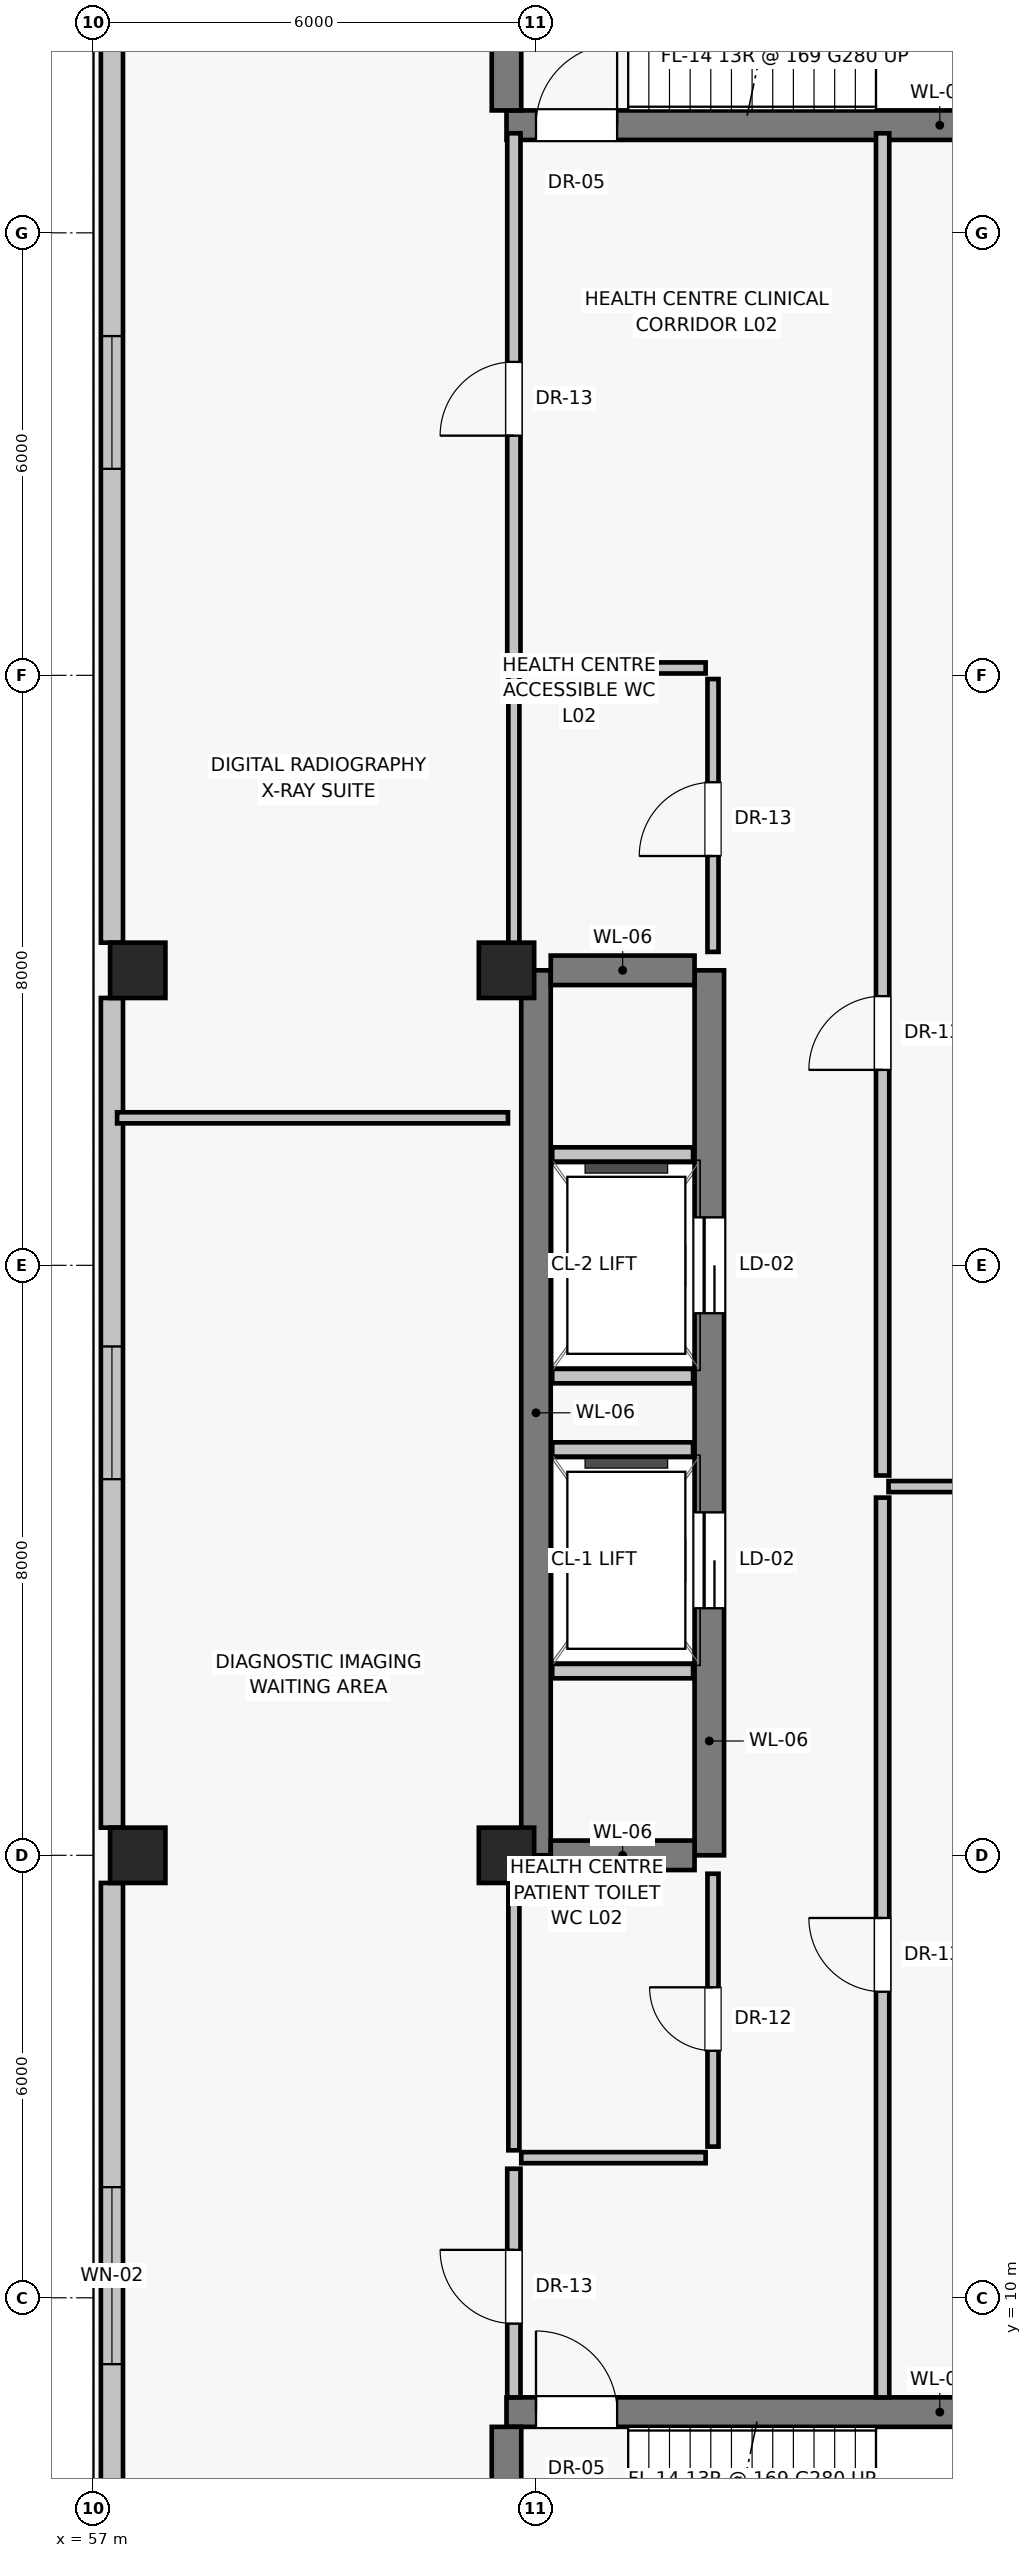
"""IFC4 building model, lengths in metres.
Left out: names, types, materials, properties, quantities, classifications, styles, units other than length and angle.
Written with IfcOpenShell. Run it as: python <this file> out.ifc"""

import sys

from ifc_helpers import new_model, si_unit, direction, frame, frame_2d, origin, origin_2d, place, context, subcontext, project, spatial, rectangle, extrude, source, transform, mapped, element, fill, save


model = new_model("IFC4")
c1 = context("Model", 3, precision=1e-05, world=origin(), true_north=direction((0.0, 1.0)))
c2 = subcontext(c1, "Body", "Model", "MODEL_VIEW")
j1 = project(units=[si_unit("LENGTHUNIT", "METRE"), si_unit("PLANEANGLEUNIT", "RADIAN")], contexts=[c1])
p1 = place(None, origin())
s1 = spatial("IfcSite", under=j1, at=p1, CompositionType="ELEMENT")
p2 = place(p1, origin())
s2 = spatial("IfcBuilding", under=s1, at=p2, CompositionType="ELEMENT")
p3 = place(p2, frame((0.0, 0.0, 9.6)))
s3 = spatial("IfcBuildingStorey", under=s2, at=p3, CompositionType="ELEMENT", Elevation=9.6)
for number, where, z_axis, x_axis in (
    (1, (57.6, 16.0, 0.0), (0.0, 0.0, 1.0), (1.0, 0.0, 0.0)),
    (2, (57.6, 28.0, 0.0), (0.0, 0.0, 1.0), (1.0, 0.0, 0.0)),
    (3, (62.6, 16.0, 0.0), (0.0, 0.0, 1.0), (1.0, 0.0, 0.0)),
    (4, (62.6, 28.0, 0.0), (0.0, 0.0, 1.0), (1.0, 0.0, 0.0)),
):
    element("IfcColumn", number, at=place(p3, frame(where, z_axis=z_axis, x_axis=x_axis)), inside=s3, PredefinedType="COLUMN", context=c2, shape_type="SweptSolid", body=[
        extrude(rectangle(XDim=0.75, YDim=0.75, at=origin_2d()), origin(), (0.0, 0.0, 1.0), 4.4),
    ])
p4 = place(p3, frame((57.25, 43.6, 0.0), z_axis=(0.0, 0.0, 1.0), x_axis=(0.0, -1.0, 0.0)))
e5 = element("IfcWall", 5, at=p4, inside=s3, PredefinedType="SOLIDWALL", context=c2, shape_type="SweptSolid", body=[
    extrude(rectangle(XDim=15.225, YDim=0.3, at=frame_2d((7.613, 0.0))), origin(), (0.0, 0.0, 1.0), 3.35),
])
p5 = place(p4, frame((7.0, 0.0, 0.85)))
e6 = element("IfcOpeningElement", 6, at=p5, cuts=e5, PredefinedType="OPENING", context=c2, shape_type="SweptSolid", body=[
    extrude(rectangle(XDim=1.8, YDim=1.65, at=frame_2d((0.9, 0.825))), frame((0.0, 0.16, 0.0), z_axis=(0.0, -1.0, 0.0), x_axis=(1.0, 0.0, 0.0)), (0.0, 0.0, 1.0), 0.32),
])
p6 = place(p3, frame((57.25, 27.625, 0.0), z_axis=(0.0, 0.0, 1.0), x_axis=(0.0, -1.0, 0.0)))
e7 = element("IfcWall", 7, at=p6, inside=s3, PredefinedType="SOLIDWALL", context=c2, shape_type="SweptSolid", body=[
    extrude(rectangle(XDim=11.25, YDim=0.3, at=frame_2d((5.625, 0.0))), origin(), (0.0, 0.0, 1.0), 3.35),
])
p7 = place(p6, frame((4.725, 0.0, 0.85)))
e8 = element("IfcOpeningElement", 8, at=p7, cuts=e7, PredefinedType="OPENING", context=c2, shape_type="SweptSolid", body=[
    extrude(rectangle(XDim=1.8, YDim=1.65, at=frame_2d((0.9, 0.825))), frame((0.0, 0.16, 0.0), z_axis=(0.0, -1.0, 0.0), x_axis=(1.0, 0.0, 0.0)), (0.0, 0.0, 1.0), 0.32),
])
p8 = place(p3, frame((57.25, 15.625, 0.0), z_axis=(0.0, 0.0, 1.0), x_axis=(0.0, -1.0, 0.0)))
e9 = element("IfcWall", 9, at=p8, inside=s3, PredefinedType="SOLIDWALL", context=c2, shape_type="SweptSolid", body=[
    extrude(rectangle(XDim=11.225, YDim=0.3, at=frame_2d((5.613, 0.0))), origin(), (0.0, 0.0, 1.0), 3.35),
])
p9 = place(p8, frame((4.125, 0.0, 0.85)))
e10 = element("IfcOpeningElement", 10, at=p9, cuts=e9, PredefinedType="OPENING", context=c2, shape_type="SweptSolid", body=[
    extrude(rectangle(XDim=2.4, YDim=1.8, at=frame_2d((1.2, 0.9))), frame((0.0, 0.16, 0.0), z_axis=(0.0, -1.0, 0.0), x_axis=(1.0, 0.0, 0.0)), (0.0, 0.0, 1.0), 0.32),
])
p10 = place(p3, frame((63.0, 16.0, 0.0), z_axis=(0.0, 0.0, 1.0), x_axis=(0.0, 1.0, 0.0)))
e11 = element("IfcWall", 11, at=p10, inside=s3, PredefinedType="SHEAR", context=c2, shape_type="SweptSolid", body=[
    extrude(rectangle(XDim=12.0, YDim=0.4, at=frame_2d((6.0, 0.0))), origin(), (0.0, 0.0, 1.0), 4.1),
])
p11 = place(p3, frame((65.35, 16.0, 0.0), z_axis=(0.0, 0.0, 1.0), x_axis=(0.0, 1.0, 0.0)))
e12 = element("IfcWall", 12, at=p11, inside=s3, PredefinedType="SHEAR", context=c2, shape_type="SweptSolid", body=[
    extrude(rectangle(XDim=12.0, YDim=0.4, at=frame_2d((6.0, 0.0))), origin(), (0.0, 0.0, 1.0), 4.1),
])
p12 = place(p11, frame((3.35, 0.0, 0.0)))
e13 = element("IfcOpeningElement", 13, at=p12, cuts=e12, PredefinedType="OPENING", context=c2, shape_type="SweptSolid", body=[
    extrude(rectangle(XDim=1.3, YDim=2.25, at=frame_2d((0.65, 1.125))), frame((0.0, 0.21, 0.0), z_axis=(0.0, -1.0, 0.0), x_axis=(1.0, 0.0, 0.0)), (0.0, 0.0, 1.0), 0.42),
])
p13 = place(p11, frame((7.35, 0.0, 0.0)))
e14 = element("IfcOpeningElement", 14, at=p13, cuts=e12, PredefinedType="OPENING", context=c2, shape_type="SweptSolid", body=[
    extrude(rectangle(XDim=1.3, YDim=2.25, at=frame_2d((0.65, 1.125))), frame((0.0, 0.21, 0.0), z_axis=(0.0, -1.0, 0.0), x_axis=(1.0, 0.0, 0.0)), (0.0, 0.0, 1.0), 0.42),
])
for number, where, z_axis, x_axis in (
    (15, (63.2, 16.0, 0.0), (0.0, 0.0, 1.0), (1.0, 0.0, 0.0)),
    (16, (63.2, 28.0, 0.0), (0.0, 0.0, 1.0), (1.0, 0.0, 0.0)),
):
    element("IfcWall", number, at=place(p3, frame(where, z_axis=z_axis, x_axis=x_axis)), inside=s3, PredefinedType="SHEAR", context=c2, shape_type="SweptSolid", body=[
        extrude(rectangle(XDim=1.95, YDim=0.4, at=frame_2d((0.975, 0.0))), origin(), (0.0, 0.0, 1.0), 4.1),
    ])
for number, where, z_axis, x_axis in (
    (17, (63.22, 18.5, 0.0), (0.0, 0.0, 1.0), (1.0, 0.0, 0.0)),
    (18, (63.22, 21.5, 0.0), (0.0, 0.0, 1.0), (1.0, 0.0, 0.0)),
    (19, (63.22, 22.5, 0.0), (0.0, 0.0, 1.0), (1.0, 0.0, 0.0)),
    (20, (63.22, 25.5, 0.0), (0.0, 0.0, 1.0), (1.0, 0.0, 0.0)),
):
    element("IfcWall", number, at=place(p3, frame(where, z_axis=z_axis, x_axis=x_axis)), inside=s3, PredefinedType="SOLIDWALL", context=c2, shape_type="SweptSolid", body=[
        extrude(rectangle(XDim=1.91, YDim=0.2, at=frame_2d((0.955, 0.0))), origin(), (0.0, 0.0, 1.0), 4.1),
    ])
p14 = place(p3, frame((62.6, 8.45, 0.0), z_axis=(0.0, 0.0, 1.0), x_axis=(1.0, 0.0, 0.0)))
e21 = element("IfcWall", 21, at=p14, inside=s3, PredefinedType="SHEAR", context=c2, shape_type="SweptSolid", body=[
    extrude(rectangle(XDim=10.0, YDim=0.4, at=frame_2d((5.0, 0.0))), origin(), (0.0, 0.0, 1.0), 4.1),
])
p15 = place(p14, frame((0.4, 0.0, 0.0)))
e22 = element("IfcOpeningElement", 22, at=p15, cuts=e21, PredefinedType="OPENING", context=c2, shape_type="SweptSolid", body=[
    extrude(rectangle(XDim=1.1, YDim=2.03, at=frame_2d((0.55, 1.015))), frame((0.0, 0.21, 0.0), z_axis=(0.0, -1.0, 0.0), x_axis=(1.0, 0.0, 0.0)), (0.0, 0.0, 1.0), 0.42),
])
p16 = place(p3, frame((62.6, 5.2, 0.0), z_axis=(0.0, 0.0, 1.0), x_axis=(0.0, 1.0, 0.0)))
e23 = element("IfcWall", 23, at=p16, inside=s3, PredefinedType="SHEAR", context=c2, shape_type="SweptSolid", body=[
    extrude(rectangle(XDim=3.05, YDim=0.4, at=frame_2d((1.525, 0.0))), origin(), (0.0, 0.0, 1.0), 4.1),
])
p17 = place(p3, frame((62.6, 39.46, 0.0), z_axis=(0.0, 0.0, 1.0), x_axis=(1.0, 0.0, 0.0)))
e24 = element("IfcWall", 24, at=p17, inside=s3, PredefinedType="SHEAR", context=c2, shape_type="SweptSolid", body=[
    extrude(rectangle(XDim=10.0, YDim=0.4, at=frame_2d((5.0, 0.0))), origin(), (0.0, 0.0, 1.0), 4.1),
])
p18 = place(p17, frame((0.4, 0.0, 0.0)))
e25 = element("IfcOpeningElement", 25, at=p18, cuts=e24, PredefinedType="OPENING", context=c2, shape_type="SweptSolid", body=[
    extrude(rectangle(XDim=1.1, YDim=2.03, at=frame_2d((0.55, 1.015))), frame((0.0, 0.21, 0.0), z_axis=(0.0, -1.0, 0.0), x_axis=(1.0, 0.0, 0.0)), (0.0, 0.0, 1.0), 0.42),
])
p19 = place(p3, frame((62.6, 39.66, 0.0), z_axis=(0.0, 0.0, 1.0), x_axis=(0.0, 1.0, 0.0)))
e26 = element("IfcWall", 26, at=p19, inside=s3, PredefinedType="SHEAR", context=c2, shape_type="SweptSolid", body=[
    extrude(rectangle(XDim=3.05, YDim=0.4, at=frame_2d((1.525, 0.0))), origin(), (0.0, 0.0, 1.0), 4.1),
])
p20 = place(p3, frame((62.8, 11.9, 0.0), z_axis=(0.0, 0.0, 1.0), x_axis=(1.0, 0.0, 0.0)))
e27 = element("IfcWall", 27, at=p20, inside=s3, PredefinedType="PARTITIONING", context=c2, shape_type="SweptSolid", body=[
    extrude(rectangle(XDim=2.5, YDim=0.15, at=frame_2d((1.25, 0.0))), origin(), (0.0, 0.0, 1.0), 4.1),
])
p21 = place(p3, frame((62.7, 12.0, 0.0), z_axis=(0.0, 0.0, 1.0), x_axis=(0.0, 1.0, 0.0)))
e28 = element("IfcWall", 28, at=p21, inside=s3, PredefinedType="PARTITIONING", context=c2, shape_type="SweptSolid", body=[
    extrude(rectangle(XDim=3.8, YDim=0.15, at=frame_2d((1.9, 0.0))), origin(), (0.0, 0.0, 1.0), 3.5),
])
p22 = place(p3, frame((65.4, 12.05, 0.0), z_axis=(0.0, 0.0, 1.0), x_axis=(0.0, 1.0, 0.0)))
e29 = element("IfcWall", 29, at=p22, inside=s3, PredefinedType="PARTITIONING", context=c2, shape_type="SweptSolid", body=[
    extrude(rectangle(XDim=3.7, YDim=0.15, at=frame_2d((1.85, 0.0))), origin(), (0.0, 0.0, 1.0), 4.1),
])
p23 = place(p22, frame((1.3, 0.0, 0.0)))
e30 = element("IfcOpeningElement", 30, at=p23, cuts=e29, PredefinedType="OPENING", context=c2, shape_type="SweptSolid", body=[
    extrude(rectangle(XDim=0.86, YDim=2.01, at=frame_2d((0.43, 1.005))), frame((0.0, 0.085, 0.0), z_axis=(0.0, -1.0, 0.0), x_axis=(1.0, 0.0, 0.0)), (0.0, 0.0, 1.0), 0.17),
])
p24 = place(p3, frame((62.8, 32.1, 0.0), z_axis=(0.0, 0.0, 1.0), x_axis=(1.0, 0.0, 0.0)))
e31 = element("IfcWall", 31, at=p24, inside=s3, PredefinedType="PARTITIONING", context=c2, shape_type="SweptSolid", body=[
    extrude(rectangle(XDim=2.5, YDim=0.15, at=frame_2d((1.25, 0.0))), origin(), (0.0, 0.0, 1.0), 4.1),
])
p25 = place(p3, frame((62.7, 28.2, 0.0), z_axis=(0.0, 0.0, 1.0), x_axis=(0.0, 1.0, 0.0)))
e32 = element("IfcWall", 32, at=p25, inside=s3, PredefinedType="PARTITIONING", context=c2, shape_type="SweptSolid", body=[
    extrude(rectangle(XDim=3.8, YDim=0.15, at=frame_2d((1.9, 0.0))), origin(), (0.0, 0.0, 1.0), 3.5),
])
p26 = place(p3, frame((65.4, 28.25, 0.0), z_axis=(0.0, 0.0, 1.0), x_axis=(0.0, 1.0, 0.0)))
e33 = element("IfcWall", 33, at=p26, inside=s3, PredefinedType="PARTITIONING", context=c2, shape_type="SweptSolid", body=[
    extrude(rectangle(XDim=3.7, YDim=0.15, at=frame_2d((1.85, 0.0))), origin(), (0.0, 0.0, 1.0), 4.1),
])
p27 = place(p26, frame((1.3, 0.0, 0.0)))
e34 = element("IfcOpeningElement", 34, at=p27, cuts=e33, PredefinedType="OPENING", context=c2, shape_type="SweptSolid", body=[
    extrude(rectangle(XDim=1.0, YDim=2.01, at=frame_2d((0.5, 1.005))), frame((0.0, 0.085, 0.0), z_axis=(0.0, -1.0, 0.0), x_axis=(1.0, 0.0, 0.0)), (0.0, 0.0, 1.0), 0.17),
])
p28 = place(p3, frame((62.7, 8.65, 0.0), z_axis=(0.0, 0.0, 1.0), x_axis=(0.0, 1.0, 0.0)))
e35 = element("IfcWall", 35, at=p28, inside=s3, PredefinedType="PARTITIONING", context=c2, shape_type="SweptSolid", body=[
    extrude(rectangle(XDim=3.1, YDim=0.18, at=frame_2d((1.55, 0.0))), origin(), (0.0, 0.0, 1.0), 3.5),
])
p29 = place(p28, frame((1.0, 0.0, 0.0)))
e36 = element("IfcOpeningElement", 36, at=p29, cuts=e35, PredefinedType="OPENING", context=c2, shape_type="SweptSolid", body=[
    extrude(rectangle(XDim=1.0, YDim=2.01, at=frame_2d((0.5, 1.005))), frame((0.0, 0.1, 0.0), z_axis=(0.0, -1.0, 0.0), x_axis=(1.0, 0.0, 0.0)), (0.0, 0.0, 1.0), 0.2),
])
p30 = place(p3, frame((62.7, 32.25, 0.0), z_axis=(0.0, 0.0, 1.0), x_axis=(0.0, 1.0, 0.0)))
e37 = element("IfcWall", 37, at=p30, inside=s3, PredefinedType="PARTITIONING", context=c2, shape_type="SweptSolid", body=[
    extrude(rectangle(XDim=7.1, YDim=0.18, at=frame_2d((3.55, 0.0))), origin(), (0.0, 0.0, 1.0), 3.5),
])
p31 = place(p30, frame((3.0, 0.0, 0.0)))
e38 = element("IfcOpeningElement", 38, at=p31, cuts=e37, PredefinedType="OPENING", context=c2, shape_type="SweptSolid", body=[
    extrude(rectangle(XDim=1.0, YDim=2.01, at=frame_2d((0.5, 1.005))), frame((0.0, 0.1, 0.0), z_axis=(0.0, -1.0, 0.0), x_axis=(1.0, 0.0, 0.0)), (0.0, 0.0, 1.0), 0.2),
])
p32 = place(p3, frame((57.32, 26.0, 0.0), z_axis=(0.0, 0.0, 1.0), x_axis=(1.0, 0.0, 0.0)))
e39 = element("IfcWall", 39, at=p32, inside=s3, PredefinedType="PARTITIONING", context=c2, shape_type="SweptSolid", body=[
    extrude(rectangle(XDim=5.3, YDim=0.15, at=frame_2d((2.65, 0.0))), origin(), (0.0, 0.0, 1.0), 4.1),
])
p33 = place(p3, frame((67.7, 8.65, 0.0), z_axis=(0.0, 0.0, 1.0), x_axis=(0.0, 1.0, 0.0)))
e40 = element("IfcWall", 40, at=p33, inside=s3, PredefinedType="PARTITIONING", context=c2, shape_type="SweptSolid", body=[
    extrude(rectangle(XDim=12.2, YDim=0.18, at=frame_2d((6.1, 0.0))), origin(), (0.0, 0.0, 1.0), 4.1),
])
p34 = place(p33, frame((5.5, 0.0, 0.0)))
e41 = element("IfcOpeningElement", 41, at=p34, cuts=e40, PredefinedType="OPENING", context=c2, shape_type="SweptSolid", body=[
    extrude(rectangle(XDim=1.0, YDim=2.01, at=frame_2d((0.5, 1.005))), frame((0.0, 0.1, 0.0), z_axis=(0.0, -1.0, 0.0), x_axis=(1.0, 0.0, 0.0)), (0.0, 0.0, 1.0), 0.2),
])
p35 = place(p3, frame((67.7, 21.15, 0.0), z_axis=(0.0, 0.0, 1.0), x_axis=(0.0, 1.0, 0.0)))
e42 = element("IfcWall", 42, at=p35, inside=s3, PredefinedType="PARTITIONING", context=c2, shape_type="SweptSolid", body=[
    extrude(rectangle(XDim=18.2, YDim=0.18, at=frame_2d((9.1, 0.0))), origin(), (0.0, 0.0, 1.0), 4.1),
])
p36 = place(p35, frame((5.5, 0.0, 0.0)))
e43 = element("IfcOpeningElement", 43, at=p36, cuts=e42, PredefinedType="OPENING", context=c2, shape_type="SweptSolid", body=[
    extrude(rectangle(XDim=1.0, YDim=2.01, at=frame_2d((0.5, 1.005))), frame((0.0, 0.1, 0.0), z_axis=(0.0, -1.0, 0.0), x_axis=(1.0, 0.0, 0.0)), (0.0, 0.0, 1.0), 0.2),
])
p37 = place(p3, frame((67.78, 21.0, 0.0), z_axis=(0.0, 0.0, 1.0), x_axis=(1.0, 0.0, 0.0)))
e44 = element("IfcWall", 44, at=p37, inside=s3, PredefinedType="PARTITIONING", context=c2, shape_type="SweptSolid", body=[
    extrude(rectangle(XDim=6.9, YDim=0.15, at=frame_2d((3.45, 0.0))), origin(), (0.0, 0.0, 1.0), 4.1),
])
m1 = source(origin(), c2, "Body", "SweptSolid", [
    extrude(rectangle(XDim=1.8, YDim=1.65, at=frame_2d((0.9, 0.825))), frame((0.0, 0.03, 0.0), z_axis=(0.0, -1.0, 0.0), x_axis=(1.0, 0.0, 0.0)), (0.0, 0.0, 1.0), 0.06),
])
p38 = place(p5, origin())
e45 = element("IfcWindow", 45, at=p38, inside=s3, PartitioningType="DOUBLE_PANEL_VERTICAL", PredefinedType="WINDOW", context=c2, shape_type="MappedRepresentation", body=[
    mapped(m1, transform((0.0, 0.0, 0.0), scale=1.0)),
])
fill(e6, e45)
p39 = place(p7, origin())
e46 = element("IfcWindow", 46, at=p39, inside=s3, PartitioningType="DOUBLE_PANEL_VERTICAL", PredefinedType="WINDOW", context=c2, shape_type="MappedRepresentation", body=[
    mapped(m1, transform((0.0, 0.0, 0.0), scale=1.0)),
])
fill(e8, e46)
m2 = source(origin(), c2, "Body", "SweptSolid", [
    extrude(rectangle(XDim=2.4, YDim=1.8, at=frame_2d((1.2, 0.9))), frame((0.0, 0.03, 0.0), z_axis=(0.0, -1.0, 0.0), x_axis=(1.0, 0.0, 0.0)), (0.0, 0.0, 1.0), 0.06),
])
p40 = place(p9, origin())
e47 = element("IfcWindow", 47, at=p40, inside=s3, PartitioningType="SINGLE_PANEL", PredefinedType="WINDOW", context=c2, shape_type="MappedRepresentation", body=[
    mapped(m2, transform((0.0, 0.0, 0.0), scale=1.0)),
])
fill(e10, e47)
m3 = source(origin(), c2, "Body", "SweptSolid", [
    extrude(rectangle(XDim=1.3, YDim=2.25, at=frame_2d((0.65, 1.125))), frame((0.0, 0.025, 0.0), z_axis=(0.0, -1.0, 0.0), x_axis=(1.0, 0.0, 0.0)), (0.0, 0.0, 1.0), 0.05),
])
p41 = place(p12, origin())
e48 = element("IfcDoor", 48, at=p41, inside=s3, OperationType="SLIDING_TO_LEFT", PredefinedType="DOOR", context=c2, shape_type="MappedRepresentation", body=[
    mapped(m3, transform((0.0, 0.0, 0.0), scale=1.0)),
])
fill(e13, e48)
p42 = place(p13, origin())
e49 = element("IfcDoor", 49, at=p42, inside=s3, OperationType="SLIDING_TO_LEFT", PredefinedType="DOOR", context=c2, shape_type="MappedRepresentation", body=[
    mapped(m3, transform((0.0, 0.0, 0.0), scale=1.0)),
])
fill(e14, e49)
m4 = source(origin(), c2, "Body", "SweptSolid", [
    extrude(rectangle(XDim=1.1, YDim=2.03, at=frame_2d((0.55, 1.015))), frame((0.0, 0.025, 0.0), z_axis=(0.0, -1.0, 0.0), x_axis=(1.0, 0.0, 0.0)), (0.0, 0.0, 1.0), 0.05),
])
p43 = place(p15, origin())
e50 = element("IfcDoor", 50, at=p43, inside=s3, OperationType="SINGLE_SWING_LEFT", PredefinedType="DOOR", context=c2, shape_type="MappedRepresentation", body=[
    mapped(m4, transform((0.0, 0.0, 0.0), scale=1.0)),
])
fill(e22, e50)
p44 = place(p18, origin())
e51 = element("IfcDoor", 51, at=p44, inside=s3, OperationType="SINGLE_SWING_RIGHT", PredefinedType="DOOR", context=c2, shape_type="MappedRepresentation", body=[
    mapped(m4, transform((0.0, 0.0, 0.0), scale=1.0)),
])
fill(e25, e51)
m5 = source(origin(), c2, "Body", "SweptSolid", [
    extrude(rectangle(XDim=0.86, YDim=2.01, at=frame_2d((0.43, 1.005))), frame((0.0, 0.025, 0.0), z_axis=(0.0, -1.0, 0.0), x_axis=(1.0, 0.0, 0.0)), (0.0, 0.0, 1.0), 0.05),
])
p45 = place(p23, origin())
e52 = element("IfcDoor", 52, at=p45, inside=s3, OperationType="SINGLE_SWING_RIGHT", PredefinedType="DOOR", context=c2, shape_type="MappedRepresentation", body=[
    mapped(m5, transform((0.0, 0.0, 0.0), scale=1.0)),
])
fill(e30, e52)
m6 = source(origin(), c2, "Body", "SweptSolid", [
    extrude(rectangle(XDim=1.0, YDim=2.01, at=frame_2d((0.5, 1.005))), frame((0.0, 0.025, 0.0), z_axis=(0.0, -1.0, 0.0), x_axis=(1.0, 0.0, 0.0)), (0.0, 0.0, 1.0), 0.05),
])
p46 = place(p27, origin())
e53 = element("IfcDoor", 53, at=p46, inside=s3, OperationType="SINGLE_SWING_LEFT", PredefinedType="DOOR", context=c2, shape_type="MappedRepresentation", body=[
    mapped(m6, transform((0.0, 0.0, 0.0), scale=1.0)),
])
fill(e34, e53)
p47 = place(p29, origin())
e54 = element("IfcDoor", 54, at=p47, inside=s3, OperationType="SINGLE_SWING_RIGHT", PredefinedType="DOOR", context=c2, shape_type="MappedRepresentation", body=[
    mapped(m6, transform((0.0, 0.0, 0.0), scale=1.0)),
])
fill(e36, e54)
p48 = place(p31, origin())
e55 = element("IfcDoor", 55, at=p48, inside=s3, OperationType="SINGLE_SWING_LEFT", PredefinedType="DOOR", context=c2, shape_type="MappedRepresentation", body=[
    mapped(m6, transform((0.0, 0.0, 0.0), scale=1.0)),
])
fill(e38, e55)
p49 = place(p34, origin())
e56 = element("IfcDoor", 56, at=p49, inside=s3, OperationType="SINGLE_SWING_RIGHT", PredefinedType="DOOR", context=c2, shape_type="MappedRepresentation", body=[
    mapped(m6, transform((0.0, 0.0, 0.0), scale=1.0)),
])
fill(e41, e56)
p50 = place(p36, origin())
e57 = element("IfcDoor", 57, at=p50, inside=s3, OperationType="SINGLE_SWING_LEFT", PredefinedType="DOOR", context=c2, shape_type="MappedRepresentation", body=[
    mapped(m6, transform((0.0, 0.0, 0.0), scale=1.0)),
])
fill(e43, e57)
save(model, sys.argv[1])
